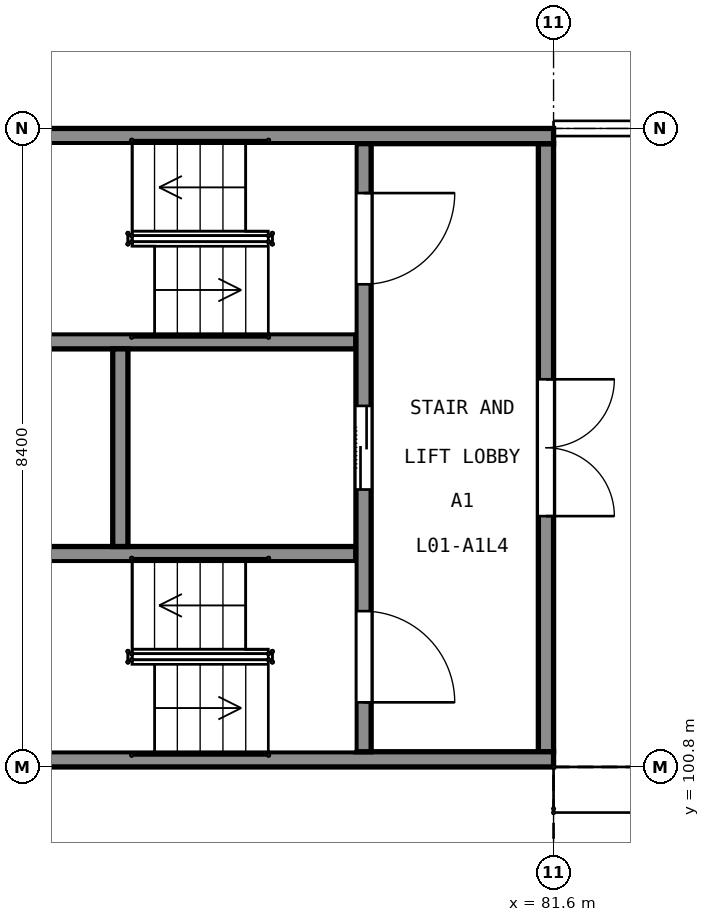
"""IFC4 building model, lengths in metres.
Left out: names, types, materials, properties, quantities, classifications, styles, units other than length and angle.
Written with IfcOpenShell. Run it as: python <this file> out.ifc"""

import sys

from ifc_helpers import new_model, si_unit, direction, frame, frame_2d, origin, place, context, subcontext, project, spatial, rectangle, extrude, element, fill, save


model = new_model("IFC4")
c1 = context("Model", 3, precision=1e-05, world=origin(), true_north=direction((0.0, 1.0)))
c2 = subcontext(c1, "Body", "Model", "MODEL_VIEW")
j1 = project(units=[si_unit("LENGTHUNIT", "METRE"), si_unit("PLANEANGLEUNIT", "RADIAN")], contexts=[c1])
p1 = place(None, origin())
s1 = spatial("IfcSite", under=j1, at=p1, CompositionType="ELEMENT")
p2 = place(p1, origin())
s2 = spatial("IfcBuilding", under=s1, at=p2, CompositionType="ELEMENT")
p3 = place(p2, frame((0.0, 0.0, 5.5)))
s3 = spatial("IfcBuildingStorey", under=s2, at=p3, CompositionType="ELEMENT", Elevation=5.5)
for number, where, z_axis, x_axis in (
    (1, (73.2, 100.9, 0.0), (0.0, 0.0, 1.0), (1.0, 0.0, 0.0)),
    (2, (73.2, 109.1, 0.0), (0.0, 0.0, 1.0), (1.0, 0.0, 0.0)),
):
    element("IfcWall", number, at=place(p3, frame(where, z_axis=z_axis, x_axis=x_axis)), inside=s3, PredefinedType="SHEAR", context=c2, shape_type="SweptSolid", body=[
        extrude(rectangle(XDim=8.4, YDim=0.2, at=frame_2d((4.2, 0.0))), origin(), (0.0, 0.0, 1.0), 5.0),
    ])
p4 = place(p3, frame((81.5, 101.0, 0.0), z_axis=(0.0, 0.0, 1.0), x_axis=(0.0, 1.0, 0.0)))
e3 = element("IfcWall", 3, at=p4, inside=s3, PredefinedType="SHEAR", context=c2, shape_type="SweptSolid", body=[
    extrude(rectangle(XDim=8.0, YDim=0.2, at=frame_2d((4.0, 0.0))), origin(), (0.0, 0.0, 1.0), 5.0),
])
p5 = place(p4, frame((3.1, 0.0, 0.0)))
e4 = element("IfcOpeningElement", 4, at=p5, cuts=e3, PredefinedType="OPENING", context=c2, shape_type="SweptSolid", body=[
    extrude(rectangle(XDim=1.8, YDim=2.1, at=frame_2d((0.9, 1.05))), frame((0.0, 0.11, 0.0), z_axis=(0.0, -1.0, 0.0), x_axis=(1.0, 0.0, 0.0)), (0.0, 0.0, 1.0), 0.22),
])
p6 = place(p3, frame((79.1, 101.0, 0.0), z_axis=(0.0, 0.0, 1.0), x_axis=(0.0, 1.0, 0.0)))
e5 = element("IfcWall", 5, at=p6, inside=s3, PredefinedType="SHEAR", context=c2, shape_type="SweptSolid", body=[
    extrude(rectangle(XDim=8.0, YDim=0.2, at=frame_2d((4.0, 0.0))), origin(), (0.0, 0.0, 1.0), 5.0),
])
p7 = place(p6, frame((0.65, 0.0, 0.0)))
e6 = element("IfcOpeningElement", 6, at=p7, cuts=e5, PredefinedType="OPENING", context=c2, shape_type="SweptSolid", body=[
    extrude(rectangle(XDim=1.2, YDim=2.1, at=frame_2d((0.6, 1.05))), frame((0.0, 0.11, 0.0), z_axis=(0.0, -1.0, 0.0), x_axis=(1.0, 0.0, 0.0)), (0.0, 0.0, 1.0), 0.22),
])
p8 = place(p6, frame((6.15, 0.0, 0.0)))
e7 = element("IfcOpeningElement", 7, at=p8, cuts=e5, PredefinedType="OPENING", context=c2, shape_type="SweptSolid", body=[
    extrude(rectangle(XDim=1.2, YDim=2.1, at=frame_2d((0.6, 1.05))), frame((0.0, 0.11, 0.0), z_axis=(0.0, -1.0, 0.0), x_axis=(1.0, 0.0, 0.0)), (0.0, 0.0, 1.0), 0.22),
])
p9 = place(p6, frame((3.45, 0.0, 0.0)))
e8 = element("IfcOpeningElement", 8, at=p9, cuts=e5, PredefinedType="OPENING", context=c2, shape_type="SweptSolid", body=[
    extrude(rectangle(XDim=1.1, YDim=2.1, at=frame_2d((0.55, 1.05))), frame((0.0, 0.11, 0.0), z_axis=(0.0, -1.0, 0.0), x_axis=(1.0, 0.0, 0.0)), (0.0, 0.0, 1.0), 0.22),
])
for number, where, z_axis, x_axis in (
    (9, (73.4, 103.6, 0.0), (0.0, 0.0, 1.0), (1.0, 0.0, 0.0)),
    (10, (73.4, 106.4, 0.0), (0.0, 0.0, 1.0), (1.0, 0.0, 0.0)),
):
    element("IfcWall", number, at=place(p3, frame(where, z_axis=z_axis, x_axis=x_axis)), inside=s3, PredefinedType="SHEAR", context=c2, shape_type="SweptSolid", body=[
        extrude(rectangle(XDim=5.6, YDim=0.2, at=frame_2d((2.8, 0.0))), origin(), (0.0, 0.0, 1.0), 5.0),
    ])
p10 = place(p3, frame((75.9, 103.7, 0.0), z_axis=(0.0, 0.0, 1.0), x_axis=(0.0, 1.0, 0.0)))
e11 = element("IfcWall", 11, at=p10, inside=s3, PredefinedType="SHEAR", context=c2, shape_type="SweptSolid", body=[
    extrude(rectangle(XDim=2.6, YDim=0.2, at=frame_2d((1.3, 0.0))), origin(), (0.0, 0.0, 1.0), 5.0),
])
p11 = place(p5, origin())
e12 = element("IfcDoor", 12, at=p11, inside=s3, OperationType="DOUBLE_DOOR_SINGLE_SWING", PredefinedType="DOOR", context=c2, shape_type="SweptSolid", body=[
    extrude(rectangle(XDim=1.8, YDim=2.1, at=frame_2d((0.9, 1.05))), frame((0.0, 0.025, 0.0), z_axis=(0.0, -1.0, 0.0), x_axis=(1.0, 0.0, 0.0)), (0.0, 0.0, 1.0), 0.05),
])
fill(e4, e12)
p12 = place(p7, origin())
e13 = element("IfcDoor", 13, at=p12, inside=s3, OperationType="SINGLE_SWING_LEFT", PredefinedType="DOOR", context=c2, shape_type="SweptSolid", body=[
    extrude(rectangle(XDim=1.2, YDim=2.1, at=frame_2d((0.6, 1.05))), frame((0.0, 0.025, 0.0), z_axis=(0.0, -1.0, 0.0), x_axis=(1.0, 0.0, 0.0)), (0.0, 0.0, 1.0), 0.05),
])
fill(e6, e13)
p13 = place(p8, origin())
e14 = element("IfcDoor", 14, at=p13, inside=s3, OperationType="SINGLE_SWING_RIGHT", PredefinedType="DOOR", context=c2, shape_type="SweptSolid", body=[
    extrude(rectangle(XDim=1.2, YDim=2.1, at=frame_2d((0.6, 1.05))), frame((0.0, 0.025, 0.0), z_axis=(0.0, -1.0, 0.0), x_axis=(1.0, 0.0, 0.0)), (0.0, 0.0, 1.0), 0.05),
])
fill(e7, e14)
p14 = place(p9, origin())
e15 = element("IfcDoor", 15, at=p14, inside=s3, OperationType="DOUBLE_DOOR_SLIDING", PredefinedType="DOOR", context=c2, shape_type="SweptSolid", body=[
    extrude(rectangle(XDim=1.1, YDim=2.1, at=frame_2d((0.55, 1.05))), frame((0.0, 0.025, 0.0), z_axis=(0.0, -1.0, 0.0), x_axis=(1.0, 0.0, 0.0)), (0.0, 0.0, 1.0), 0.05),
])
fill(e8, e15)
save(model, sys.argv[1])
